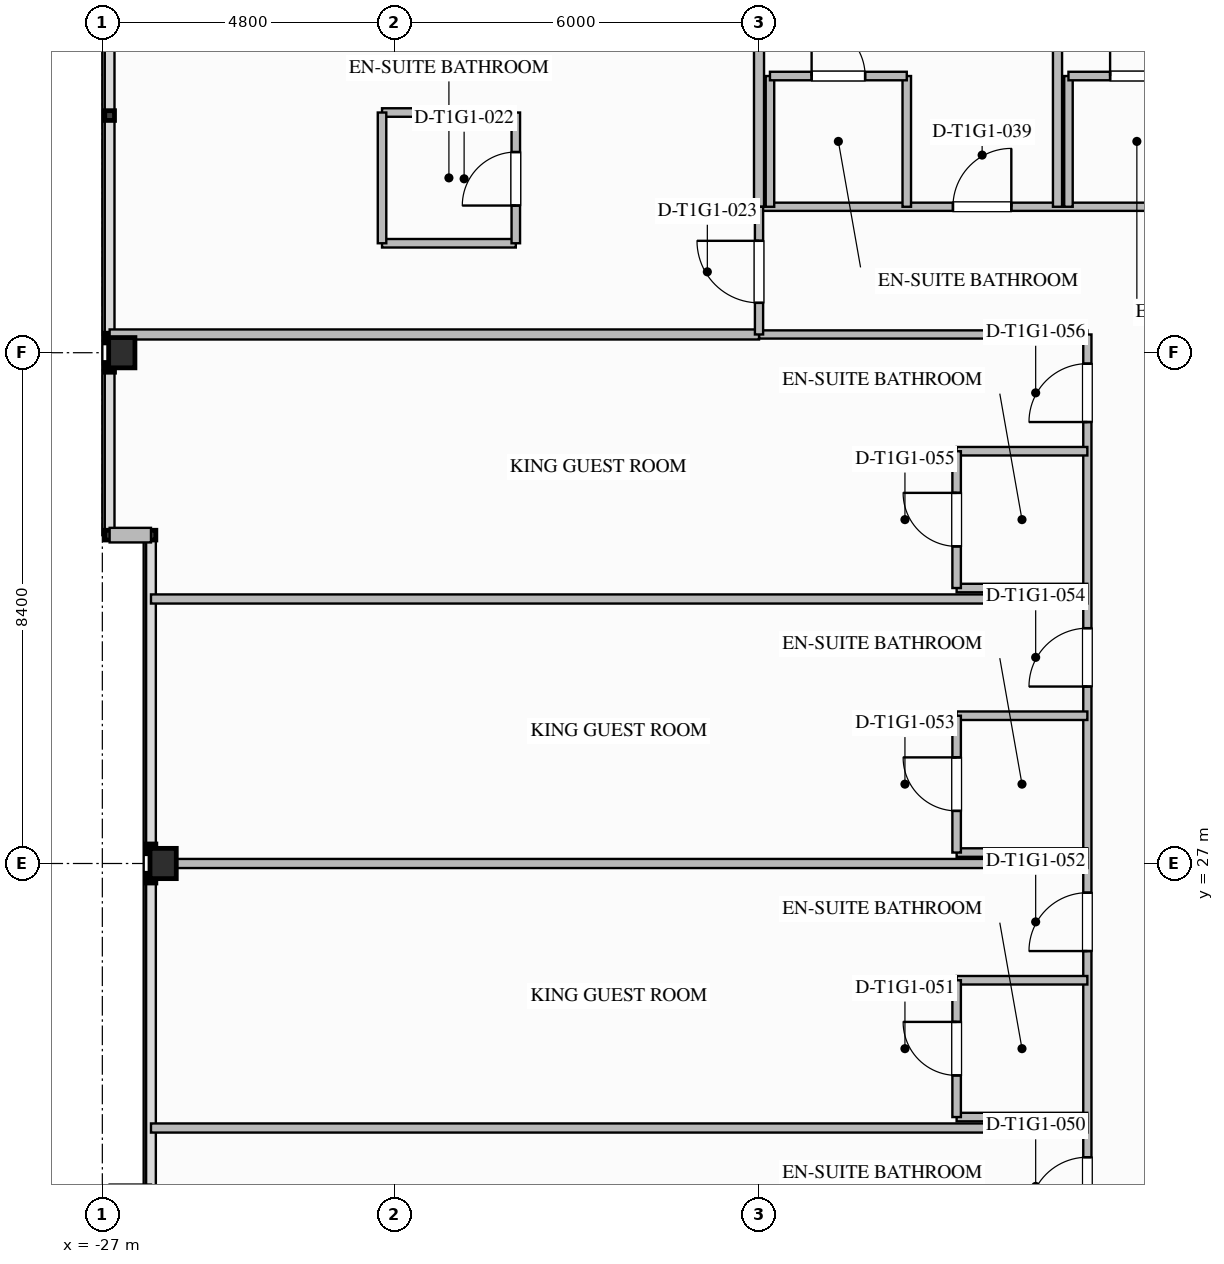
"""IFC4 building model, lengths in metres.
Left out: names, types, materials, properties, quantities, classifications, styles, units other than length and angle.
Written with IfcOpenShell. Run it as: python <this file> out.ifc"""

import sys

from ifc_helpers import new_model, si_unit, direction, frame, frame_2d, origin, origin_2d, place, context, subcontext, project, spatial, rectangle, i_section, extrude, element, fill, save


model = new_model("IFC4")
c1 = context("Model", 3, precision=1e-05, world=origin(), true_north=direction((0.0, 1.0)))
c2 = subcontext(c1, "Body", "Model", "MODEL_VIEW")
j1 = project(units=[si_unit("LENGTHUNIT", "METRE"), si_unit("PLANEANGLEUNIT", "RADIAN")], contexts=[c1])
p1 = place(None, origin())
s1 = spatial("IfcSite", under=j1, at=p1, CompositionType="ELEMENT")
p2 = place(p1, origin())
s2 = spatial("IfcBuilding", under=s1, at=p2, CompositionType="ELEMENT")
p3 = place(p2, frame((0.0, 0.0, 33.2)))
s3 = spatial("IfcBuildingStorey", under=s2, at=p3, CompositionType="ELEMENT", Elevation=33.2)
for number, where, z_axis, x_axis in (
    (1, (-26.0, 27.0, -0.26), (0.0, 0.0, 1.0), (1.0, 0.0, 0.0)),
    (2, (-26.68, 35.4, -0.26), (0.0, 0.0, 1.0), (1.0, 0.0, 0.0)),
):
    element("IfcColumn", number, at=place(p3, frame(where, z_axis=z_axis, x_axis=x_axis)), inside=s3, PredefinedType="COLUMN", context=c2, shape_type="SweptSolid", body=[
        extrude(i_section(OverallWidth=0.432, OverallDepth=0.498, WebThickness=0.056, FlangeThickness=0.089, FilletRadius=0.03, at=origin_2d()), origin(), (0.0, 0.0, 1.0), 3.757),
    ])
p4 = place(p3, frame((-26.2, 32.4, 0.0), z_axis=(0.0, 0.0, 1.0), x_axis=(-1.0, 0.0, 0.0)))
e3 = element("IfcWall", 3, at=p4, inside=s3, PredefinedType="STANDARD", context=c2, shape_type="SweptSolid", body=[
    extrude(rectangle(XDim=0.68, YDim=0.24, at=frame_2d((0.34, 0.0))), origin(), (0.0, 0.0, 1.0), 3.24),
])
p5 = place(p3, frame((-16.2, 37.8, 0.0), z_axis=(0.0, 0.0, 1.0), x_axis=(1.0, 0.0, 0.0)))
e4 = element("IfcWall", 4, at=p5, inside=s3, PredefinedType="PARTITIONING", context=c2, shape_type="SweptSolid", body=[
    extrude(rectangle(XDim=32.4, YDim=0.135, at=frame_2d((16.2, 0.0))), origin(), (0.0, 0.0, 1.0), 3.24),
])
p6 = place(p5, frame((3.189, 0.0, 0.0)))
e5 = element("IfcOpeningElement", 5, at=p6, cuts=e4, PredefinedType="OPENING", context=c2, shape_type="SweptSolid", body=[
    extrude(rectangle(XDim=0.96, YDim=2.15, at=frame_2d((0.48, 1.075))), frame((0.0, 0.077, 0.0), z_axis=(0.0, -1.0, 0.0), x_axis=(1.0, 0.0, 0.0)), (0.0, 0.0, 1.0), 0.155),
])
p7 = place(p5, frame((8.229, 0.0, 0.0)))
e6 = element("IfcOpeningElement", 6, at=p7, cuts=e4, PredefinedType="OPENING", context=c2, shape_type="SweptSolid", body=[
    extrude(rectangle(XDim=1.26, YDim=2.2, at=frame_2d((0.63, 1.1))), frame((0.0, 0.077, 0.0), z_axis=(0.0, -1.0, 0.0), x_axis=(1.0, 0.0, 0.0)), (0.0, 0.0, 1.0), 0.155),
])
p8 = place(p5, frame((12.78, 0.0, 0.0)))
e7 = element("IfcOpeningElement", 7, at=p8, cuts=e4, PredefinedType="OPENING", context=c2, shape_type="SweptSolid", body=[
    extrude(rectangle(XDim=1.02, YDim=2.15, at=frame_2d((0.51, 1.075))), frame((0.0, 0.077, 0.0), z_axis=(0.0, -1.0, 0.0), x_axis=(1.0, 0.0, 0.0)), (0.0, 0.0, 1.0), 0.155),
])
p9 = place(p5, frame((19.425, 0.0, 0.0)))
e8 = element("IfcOpeningElement", 8, at=p9, cuts=e4, PredefinedType="OPENING", context=c2, shape_type="SweptSolid", body=[
    extrude(rectangle(XDim=0.96, YDim=2.15, at=frame_2d((0.48, 1.075))), frame((0.0, 0.077, 0.0), z_axis=(0.0, -1.0, 0.0), x_axis=(1.0, 0.0, 0.0)), (0.0, 0.0, 1.0), 0.155),
])
p10 = place(p5, frame((24.92, 0.0, 0.0)))
e9 = element("IfcOpeningElement", 9, at=p10, cuts=e4, PredefinedType="OPENING", context=c2, shape_type="SweptSolid", body=[
    extrude(rectangle(XDim=1.26, YDim=2.2, at=frame_2d((0.63, 1.1))), frame((0.0, 0.077, 0.0), z_axis=(0.0, -1.0, 0.0), x_axis=(1.0, 0.0, 0.0)), (0.0, 0.0, 1.0), 0.155),
])
p11 = place(p5, frame((30.68, 0.0, 0.0)))
e10 = element("IfcOpeningElement", 10, at=p11, cuts=e4, PredefinedType="OPENING", context=c2, shape_type="SweptSolid", body=[
    extrude(rectangle(XDim=0.96, YDim=2.15, at=frame_2d((0.48, 1.075))), frame((0.0, 0.077, 0.0), z_axis=(0.0, -1.0, 0.0), x_axis=(1.0, 0.0, 0.0)), (0.0, 0.0, 1.0), 0.155),
])
p12 = place(p3, frame((-16.2, 35.7, 0.0), z_axis=(0.0, 0.0, 1.0), x_axis=(1.0, 0.0, 0.0)))
e11 = element("IfcWall", 11, at=p12, inside=s3, PredefinedType="PARTITIONING", context=c2, shape_type="SweptSolid", body=[
    extrude(rectangle(XDim=5.4, YDim=0.135, at=frame_2d((2.7, 0.0))), origin(), (0.0, 0.0, 1.0), 3.24),
])
p13 = place(p3, frame((-10.8, 18.3, 0.0), z_axis=(0.0, 0.0, 1.0), x_axis=(0.0, 1.0, 0.0)))
e12 = element("IfcWall", 12, at=p13, inside=s3, PredefinedType="PARTITIONING", context=c2, shape_type="SweptSolid", body=[
    extrude(rectangle(XDim=17.4, YDim=0.135, at=frame_2d((8.7, 0.0))), origin(), (0.0, 0.0, 1.0), 3.24),
])
p14 = place(p13, frame((2.91, 0.0, 0.0)))
e13 = element("IfcOpeningElement", 13, at=p14, cuts=e12, PredefinedType="OPENING", context=c2, shape_type="SweptSolid", body=[
    extrude(rectangle(XDim=0.96, YDim=2.15, at=frame_2d((0.48, 1.075))), frame((0.0, 0.077, 0.0), z_axis=(0.0, -1.0, 0.0), x_axis=(1.0, 0.0, 0.0)), (0.0, 0.0, 1.0), 0.155),
])
p15 = place(p13, frame((7.26, 0.0, 0.0)))
e14 = element("IfcOpeningElement", 14, at=p15, cuts=e12, PredefinedType="OPENING", context=c2, shape_type="SweptSolid", body=[
    extrude(rectangle(XDim=0.96, YDim=2.15, at=frame_2d((0.48, 1.075))), frame((0.0, 0.077, 0.0), z_axis=(0.0, -1.0, 0.0), x_axis=(1.0, 0.0, 0.0)), (0.0, 0.0, 1.0), 0.155),
])
p16 = place(p13, frame((11.61, 0.0, 0.0)))
e15 = element("IfcOpeningElement", 15, at=p16, cuts=e12, PredefinedType="OPENING", context=c2, shape_type="SweptSolid", body=[
    extrude(rectangle(XDim=0.96, YDim=2.15, at=frame_2d((0.48, 1.075))), frame((0.0, 0.077, 0.0), z_axis=(0.0, -1.0, 0.0), x_axis=(1.0, 0.0, 0.0)), (0.0, 0.0, 1.0), 0.155),
])
p17 = place(p13, frame((15.96, 0.0, 0.0)))
e16 = element("IfcOpeningElement", 16, at=p17, cuts=e12, PredefinedType="OPENING", context=c2, shape_type="SweptSolid", body=[
    extrude(rectangle(XDim=0.96, YDim=2.15, at=frame_2d((0.48, 1.075))), frame((0.0, 0.077, 0.0), z_axis=(0.0, -1.0, 0.0), x_axis=(1.0, 0.0, 0.0)), (0.0, 0.0, 1.0), 0.155),
])
p18 = place(p3, frame((-16.2, 37.8, 0.0), z_axis=(0.0, 0.0, 1.0), x_axis=(0.0, 1.0, 0.0)))
e17 = element("IfcWall", 17, at=p18, inside=s3, PredefinedType="PARTITIONING", context=c2, shape_type="SweptSolid", body=[
    extrude(rectangle(XDim=16.08, YDim=0.165, at=frame_2d((8.04, 0.0))), origin(), (0.0, 0.0, 1.0), 2.298),
])
p19 = place(p3, frame((-26.88, 35.7, 0.0), z_axis=(0.0, 0.0, 1.0), x_axis=(1.0, 0.0, 0.0)))
e18 = element("IfcWall", 18, at=p19, inside=s3, PredefinedType="PARTITIONING", context=c2, shape_type="SweptSolid", body=[
    extrude(rectangle(XDim=10.68, YDim=0.165, at=frame_2d((5.34, 0.0))), origin(), (0.0, 0.0, 1.0), 2.298),
])
p20 = place(p3, frame((-16.2, 35.7, 0.0), z_axis=(0.0, 0.0, 1.0), x_axis=(0.0, 1.0, 0.0)))
e19 = element("IfcWall", 19, at=p20, inside=s3, PredefinedType="PARTITIONING", context=c2, shape_type="SweptSolid", body=[
    extrude(rectangle(XDim=2.1, YDim=0.135, at=frame_2d((1.05, 0.0))), origin(), (0.0, 0.0, 1.0), 2.298),
])
p21 = place(p20, frame((0.52, 0.0, 0.0)))
e20 = element("IfcOpeningElement", 20, at=p21, cuts=e19, PredefinedType="OPENING", context=c2, shape_type="SweptSolid", body=[
    extrude(rectangle(XDim=1.02, YDim=2.15, at=frame_2d((0.51, 1.075))), frame((0.0, 0.077, 0.0), z_axis=(0.0, -1.0, 0.0), x_axis=(1.0, 0.0, 0.0)), (0.0, 0.0, 1.0), 0.155),
])
for number, where, z_axis, x_axis in (
    (21, (-22.4, 37.2, 0.0), (0.0, 0.0, 1.0), (1.0, 0.0, 0.0)),
    (22, (-22.4, 39.35, 0.0), (0.0, 0.0, 1.0), (1.0, 0.0, 0.0)),
):
    element("IfcWall", number, at=place(p3, frame(where, z_axis=z_axis, x_axis=x_axis)), inside=s3, PredefinedType="PLUMBINGWALL", context=c2, shape_type="SweptSolid", body=[
        extrude(rectangle(XDim=2.2, YDim=0.14, at=frame_2d((1.1, 0.0))), origin(), (0.0, 0.0, 1.0), 3.24),
    ])
p22 = place(p3, frame((-22.4, 37.2, 0.0), z_axis=(0.0, 0.0, 1.0), x_axis=(0.0, 1.0, 0.0)))
e23 = element("IfcWall", 23, at=p22, inside=s3, PredefinedType="PLUMBINGWALL", context=c2, shape_type="SweptSolid", body=[
    extrude(rectangle(XDim=2.15, YDim=0.14, at=frame_2d((1.075, 0.0))), origin(), (0.0, 0.0, 1.0), 3.24),
])
p23 = place(p3, frame((-20.2, 37.2, 0.0), z_axis=(0.0, 0.0, 1.0), x_axis=(0.0, 1.0, 0.0)))
e24 = element("IfcWall", 24, at=p23, inside=s3, PredefinedType="PLUMBINGWALL", context=c2, shape_type="SweptSolid", body=[
    extrude(rectangle(XDim=2.15, YDim=0.14, at=frame_2d((1.075, 0.0))), origin(), (0.0, 0.0, 1.0), 3.24),
])
p24 = place(p23, frame((0.62, 0.0, 0.0)))
e25 = element("IfcOpeningElement", 25, at=p24, cuts=e24, PredefinedType="OPENING", context=c2, shape_type="SweptSolid", body=[
    extrude(rectangle(XDim=0.88, YDim=2.1, at=frame_2d((0.44, 1.05))), frame((0.0, 0.08, 0.0), z_axis=(0.0, -1.0, 0.0), x_axis=(1.0, 0.0, 0.0)), (0.0, 0.0, 1.0), 0.16),
])
p25 = place(p3, frame((-16.02, 37.8, 0.0), z_axis=(0.0, 0.0, 1.0), x_axis=(0.0, 1.0, 0.0)))
e26 = element("IfcWall", 26, at=p25, inside=s3, PredefinedType="PLUMBINGWALL", context=c2, shape_type="SweptSolid", body=[
    extrude(rectangle(XDim=2.15, YDim=0.14, at=frame_2d((1.075, 0.0))), origin(), (0.0, 0.0, 1.0), 2.298),
])
p26 = place(p3, frame((-13.77, 37.8, 0.0), z_axis=(0.0, 0.0, 1.0), x_axis=(0.0, 1.0, 0.0)))
e27 = element("IfcWall", 27, at=p26, inside=s3, PredefinedType="PLUMBINGWALL", context=c2, shape_type="SweptSolid", body=[
    extrude(rectangle(XDim=2.15, YDim=0.14, at=frame_2d((1.075, 0.0))), origin(), (0.0, 0.0, 1.0), 3.24),
])
p27 = place(p3, frame((-16.02, 39.95, 0.0), z_axis=(0.0, 0.0, 1.0), x_axis=(1.0, 0.0, 0.0)))
e28 = element("IfcWall", 28, at=p27, inside=s3, PredefinedType="PLUMBINGWALL", context=c2, shape_type="SweptSolid", body=[
    extrude(rectangle(XDim=2.25, YDim=0.14, at=frame_2d((1.125, 0.0))), origin(), (0.0, 0.0, 1.0), 3.24),
])
p28 = place(p27, frame((0.685, 0.0, 0.0)))
e29 = element("IfcOpeningElement", 29, at=p28, cuts=e28, PredefinedType="OPENING", context=c2, shape_type="SweptSolid", body=[
    extrude(rectangle(XDim=0.88, YDim=2.1, at=frame_2d((0.44, 1.05))), frame((0.0, 0.08, 0.0), z_axis=(0.0, -1.0, 0.0), x_axis=(1.0, 0.0, 0.0)), (0.0, 0.0, 1.0), 0.16),
])
p29 = place(p3, frame((-11.291, 37.8, 0.0), z_axis=(0.0, 0.0, 1.0), x_axis=(0.0, 1.0, 0.0)))
e30 = element("IfcWall", 30, at=p29, inside=s3, PredefinedType="PARTITIONING", context=c2, shape_type="SweptSolid", body=[
    extrude(rectangle(XDim=16.08, YDim=0.15, at=frame_2d((8.04, 0.0))), origin(), (0.0, 0.0, 1.0), 3.24),
])
p30 = place(p3, frame((-11.111, 37.8, 0.0), z_axis=(0.0, 0.0, 1.0), x_axis=(0.0, 1.0, 0.0)))
e31 = element("IfcWall", 31, at=p30, inside=s3, PredefinedType="PLUMBINGWALL", context=c2, shape_type="SweptSolid", body=[
    extrude(rectangle(XDim=2.15, YDim=0.14, at=frame_2d((1.075, 0.0))), origin(), (0.0, 0.0, 1.0), 3.24),
])
p31 = place(p3, frame((-11.111, 39.95, 0.0), z_axis=(0.0, 0.0, 1.0), x_axis=(1.0, 0.0, 0.0)))
e32 = element("IfcWall", 32, at=p31, inside=s3, PredefinedType="PLUMBINGWALL", context=c2, shape_type="SweptSolid", body=[
    extrude(rectangle(XDim=2.25, YDim=0.14, at=frame_2d((1.125, 0.0))), origin(), (0.0, 0.0, 1.0), 3.24),
])
p32 = place(p31, frame((0.685, 0.0, 0.0)))
e33 = element("IfcOpeningElement", 33, at=p32, cuts=e32, PredefinedType="OPENING", context=c2, shape_type="SweptSolid", body=[
    extrude(rectangle(XDim=0.88, YDim=2.1, at=frame_2d((0.44, 1.05))), frame((0.0, 0.08, 0.0), z_axis=(0.0, -1.0, 0.0), x_axis=(1.0, 0.0, 0.0)), (0.0, 0.0, 1.0), 0.16),
])
p33 = place(p3, frame((-26.2, 22.65, 0.0), z_axis=(0.0, 0.0, 1.0), x_axis=(1.0, 0.0, 0.0)))
e34 = element("IfcWall", 34, at=p33, inside=s3, PredefinedType="PARTITIONING", context=c2, shape_type="SweptSolid", body=[
    extrude(rectangle(XDim=15.4, YDim=0.15, at=frame_2d((7.7, 0.0))), origin(), (0.0, 0.0, 1.0), 3.24),
])
for number, where, z_axis, x_axis in (
    (35, (-10.8, 22.83, 0.0), (0.0, 0.0, 1.0), (-1.0, 0.0, 0.0)),
    (36, (-10.8, 25.08, 0.0), (0.0, 0.0, 1.0), (-1.0, 0.0, 0.0)),
):
    element("IfcWall", number, at=place(p3, frame(where, z_axis=z_axis, x_axis=x_axis)), inside=s3, PredefinedType="PLUMBINGWALL", context=c2, shape_type="SweptSolid", body=[
        extrude(rectangle(XDim=2.15, YDim=0.14, at=frame_2d((1.075, 0.0))), origin(), (0.0, 0.0, 1.0), 3.24),
    ])
p34 = place(p3, frame((-12.95, 22.83, 0.0), z_axis=(0.0, 0.0, 1.0), x_axis=(0.0, 1.0, 0.0)))
e37 = element("IfcWall", 37, at=p34, inside=s3, PredefinedType="PLUMBINGWALL", context=c2, shape_type="SweptSolid", body=[
    extrude(rectangle(XDim=2.25, YDim=0.14, at=frame_2d((1.125, 0.0))), origin(), (0.0, 0.0, 1.0), 3.24),
])
p35 = place(p34, frame((0.685, 0.0, 0.0)))
e38 = element("IfcOpeningElement", 38, at=p35, cuts=e37, PredefinedType="OPENING", context=c2, shape_type="SweptSolid", body=[
    extrude(rectangle(XDim=0.88, YDim=2.1, at=frame_2d((0.44, 1.05))), frame((0.0, 0.08, 0.0), z_axis=(0.0, -1.0, 0.0), x_axis=(1.0, 0.0, 0.0)), (0.0, 0.0, 1.0), 0.16),
])
p36 = place(p3, frame((-26.2, 27.0, 0.0), z_axis=(0.0, 0.0, 1.0), x_axis=(1.0, 0.0, 0.0)))
e39 = element("IfcWall", 39, at=p36, inside=s3, PredefinedType="PARTITIONING", context=c2, shape_type="SweptSolid", body=[
    extrude(rectangle(XDim=15.4, YDim=0.15, at=frame_2d((7.7, 0.0))), origin(), (0.0, 0.0, 1.0), 2.298),
])
p37 = place(p3, frame((-10.8, 27.18, 0.0), z_axis=(0.0, 0.0, 1.0), x_axis=(-1.0, 0.0, 0.0)))
e40 = element("IfcWall", 40, at=p37, inside=s3, PredefinedType="PLUMBINGWALL", context=c2, shape_type="SweptSolid", body=[
    extrude(rectangle(XDim=2.15, YDim=0.14, at=frame_2d((1.075, 0.0))), origin(), (0.0, 0.0, 1.0), 2.617),
])
p38 = place(p3, frame((-10.8, 29.43, 0.0), z_axis=(0.0, 0.0, 1.0), x_axis=(-1.0, 0.0, 0.0)))
e41 = element("IfcWall", 41, at=p38, inside=s3, PredefinedType="PLUMBINGWALL", context=c2, shape_type="SweptSolid", body=[
    extrude(rectangle(XDim=2.15, YDim=0.14, at=frame_2d((1.075, 0.0))), origin(), (0.0, 0.0, 1.0), 3.24),
])
p39 = place(p3, frame((-12.95, 27.18, 0.0), z_axis=(0.0, 0.0, 1.0), x_axis=(0.0, 1.0, 0.0)))
e42 = element("IfcWall", 42, at=p39, inside=s3, PredefinedType="PLUMBINGWALL", context=c2, shape_type="SweptSolid", body=[
    extrude(rectangle(XDim=2.25, YDim=0.14, at=frame_2d((1.125, 0.0))), origin(), (0.0, 0.0, 1.0), 3.24),
])
p40 = place(p39, frame((0.685, 0.0, 0.0)))
e43 = element("IfcOpeningElement", 43, at=p40, cuts=e42, PredefinedType="OPENING", context=c2, shape_type="SweptSolid", body=[
    extrude(rectangle(XDim=0.88, YDim=2.1, at=frame_2d((0.44, 1.05))), frame((0.0, 0.08, 0.0), z_axis=(0.0, -1.0, 0.0), x_axis=(1.0, 0.0, 0.0)), (0.0, 0.0, 1.0), 0.16),
])
p41 = place(p3, frame((-26.2, 31.35, 0.0), z_axis=(0.0, 0.0, 1.0), x_axis=(1.0, 0.0, 0.0)))
e44 = element("IfcWall", 44, at=p41, inside=s3, PredefinedType="PARTITIONING", context=c2, shape_type="SweptSolid", body=[
    extrude(rectangle(XDim=15.4, YDim=0.15, at=frame_2d((7.7, 0.0))), origin(), (0.0, 0.0, 1.0), 3.24),
])
for number, where, z_axis, x_axis in (
    (45, (-10.8, 31.53, 0.0), (0.0, 0.0, 1.0), (-1.0, 0.0, 0.0)),
    (46, (-10.8, 33.78, 0.0), (0.0, 0.0, 1.0), (-1.0, 0.0, 0.0)),
):
    element("IfcWall", number, at=place(p3, frame(where, z_axis=z_axis, x_axis=x_axis)), inside=s3, PredefinedType="PLUMBINGWALL", context=c2, shape_type="SweptSolid", body=[
        extrude(rectangle(XDim=2.15, YDim=0.14, at=frame_2d((1.075, 0.0))), origin(), (0.0, 0.0, 1.0), 3.24),
    ])
p42 = place(p3, frame((-12.95, 31.53, 0.0), z_axis=(0.0, 0.0, 1.0), x_axis=(0.0, 1.0, 0.0)))
e47 = element("IfcWall", 47, at=p42, inside=s3, PredefinedType="PLUMBINGWALL", context=c2, shape_type="SweptSolid", body=[
    extrude(rectangle(XDim=2.25, YDim=0.14, at=frame_2d((1.125, 0.0))), origin(), (0.0, 0.0, 1.0), 3.24),
])
p43 = place(p42, frame((0.685, 0.0, 0.0)))
e48 = element("IfcOpeningElement", 48, at=p43, cuts=e47, PredefinedType="OPENING", context=c2, shape_type="SweptSolid", body=[
    extrude(rectangle(XDim=0.88, YDim=2.1, at=frame_2d((0.44, 1.05))), frame((0.0, 0.08, 0.0), z_axis=(0.0, -1.0, 0.0), x_axis=(1.0, 0.0, 0.0)), (0.0, 0.0, 1.0), 0.16),
])
p44 = place(p24, origin())
e49 = element("IfcDoor", 49, at=p44, inside=s3, OperationType="SINGLE_SWING_LEFT", PredefinedType="DOOR", context=c2, shape_type="SweptSolid", body=[
    extrude(rectangle(XDim=0.88, YDim=2.1, at=frame_2d((0.44, 1.05))), frame((0.0, 0.025, 0.0), z_axis=(0.0, -1.0, 0.0), x_axis=(1.0, 0.0, 0.0)), (0.0, 0.0, 1.0), 0.05),
])
fill(e25, e49)
p45 = place(p21, origin())
e50 = element("IfcDoor", 50, at=p45, inside=s3, OperationType="SINGLE_SWING_RIGHT", PredefinedType="DOOR", context=c2, shape_type="SweptSolid", body=[
    extrude(rectangle(XDim=1.02, YDim=2.15, at=frame_2d((0.51, 1.075))), frame((0.0, 0.025, 0.0), z_axis=(0.0, -1.0, 0.0), x_axis=(1.0, 0.0, 0.0)), (0.0, 0.0, 1.0), 0.05),
])
fill(e20, e50)
p46 = place(p28, origin())
e51 = element("IfcDoor", 51, at=p46, inside=s3, OperationType="SINGLE_SWING_LEFT", PredefinedType="DOOR", context=c2, shape_type="SweptSolid", body=[
    extrude(rectangle(XDim=0.88, YDim=2.1, at=frame_2d((0.44, 1.05))), frame((0.0, 0.025, 0.0), z_axis=(0.0, -1.0, 0.0), x_axis=(1.0, 0.0, 0.0)), (0.0, 0.0, 1.0), 0.05),
])
fill(e29, e51)
p47 = place(p6, origin())
e52 = element("IfcDoor", 52, at=p47, inside=s3, OperationType="SINGLE_SWING_RIGHT", PredefinedType="DOOR", context=c2, shape_type="SweptSolid", body=[
    extrude(rectangle(XDim=0.96, YDim=2.15, at=frame_2d((0.48, 1.075))), frame((0.0, 0.025, 0.0), z_axis=(0.0, -1.0, 0.0), x_axis=(1.0, 0.0, 0.0)), (0.0, 0.0, 1.0), 0.05),
])
fill(e5, e52)
p48 = place(p32, origin())
e53 = element("IfcDoor", 53, at=p48, inside=s3, OperationType="SINGLE_SWING_LEFT", PredefinedType="DOOR", context=c2, shape_type="SweptSolid", body=[
    extrude(rectangle(XDim=0.88, YDim=2.1, at=frame_2d((0.44, 1.05))), frame((0.0, 0.025, 0.0), z_axis=(0.0, -1.0, 0.0), x_axis=(1.0, 0.0, 0.0)), (0.0, 0.0, 1.0), 0.05),
])
fill(e33, e53)
p49 = place(p14, origin())
e54 = element("IfcDoor", 54, at=p49, inside=s3, OperationType="SINGLE_SWING_LEFT", PredefinedType="DOOR", context=c2, shape_type="SweptSolid", body=[
    extrude(rectangle(XDim=0.96, YDim=2.15, at=frame_2d((0.48, 1.075))), frame((0.0, 0.025, 0.0), z_axis=(0.0, -1.0, 0.0), x_axis=(1.0, 0.0, 0.0)), (0.0, 0.0, 1.0), 0.05),
])
fill(e13, e54)
p50 = place(p35, origin())
e55 = element("IfcDoor", 55, at=p50, inside=s3, OperationType="SINGLE_SWING_RIGHT", PredefinedType="DOOR", context=c2, shape_type="SweptSolid", body=[
    extrude(rectangle(XDim=0.88, YDim=2.1, at=frame_2d((0.44, 1.05))), frame((0.0, 0.025, 0.0), z_axis=(0.0, -1.0, 0.0), x_axis=(1.0, 0.0, 0.0)), (0.0, 0.0, 1.0), 0.05),
])
fill(e38, e55)
p51 = place(p15, origin())
e56 = element("IfcDoor", 56, at=p51, inside=s3, OperationType="SINGLE_SWING_LEFT", PredefinedType="DOOR", context=c2, shape_type="SweptSolid", body=[
    extrude(rectangle(XDim=0.96, YDim=2.15, at=frame_2d((0.48, 1.075))), frame((0.0, 0.025, 0.0), z_axis=(0.0, -1.0, 0.0), x_axis=(1.0, 0.0, 0.0)), (0.0, 0.0, 1.0), 0.05),
])
fill(e14, e56)
p52 = place(p40, origin())
e57 = element("IfcDoor", 57, at=p52, inside=s3, OperationType="SINGLE_SWING_RIGHT", PredefinedType="DOOR", context=c2, shape_type="SweptSolid", body=[
    extrude(rectangle(XDim=0.88, YDim=2.1, at=frame_2d((0.44, 1.05))), frame((0.0, 0.025, 0.0), z_axis=(0.0, -1.0, 0.0), x_axis=(1.0, 0.0, 0.0)), (0.0, 0.0, 1.0), 0.05),
])
fill(e43, e57)
p53 = place(p16, origin())
e58 = element("IfcDoor", 58, at=p53, inside=s3, OperationType="SINGLE_SWING_LEFT", PredefinedType="DOOR", context=c2, shape_type="SweptSolid", body=[
    extrude(rectangle(XDim=0.96, YDim=2.15, at=frame_2d((0.48, 1.075))), frame((0.0, 0.025, 0.0), z_axis=(0.0, -1.0, 0.0), x_axis=(1.0, 0.0, 0.0)), (0.0, 0.0, 1.0), 0.05),
])
fill(e15, e58)
p54 = place(p43, origin())
e59 = element("IfcDoor", 59, at=p54, inside=s3, OperationType="SINGLE_SWING_RIGHT", PredefinedType="DOOR", context=c2, shape_type="SweptSolid", body=[
    extrude(rectangle(XDim=0.88, YDim=2.1, at=frame_2d((0.44, 1.05))), frame((0.0, 0.025, 0.0), z_axis=(0.0, -1.0, 0.0), x_axis=(1.0, 0.0, 0.0)), (0.0, 0.0, 1.0), 0.05),
])
fill(e48, e59)
p55 = place(p17, origin())
e60 = element("IfcDoor", 60, at=p55, inside=s3, OperationType="SINGLE_SWING_LEFT", PredefinedType="DOOR", context=c2, shape_type="SweptSolid", body=[
    extrude(rectangle(XDim=0.96, YDim=2.15, at=frame_2d((0.48, 1.075))), frame((0.0, 0.025, 0.0), z_axis=(0.0, -1.0, 0.0), x_axis=(1.0, 0.0, 0.0)), (0.0, 0.0, 1.0), 0.05),
])
fill(e16, e60)
save(model, sys.argv[1])
